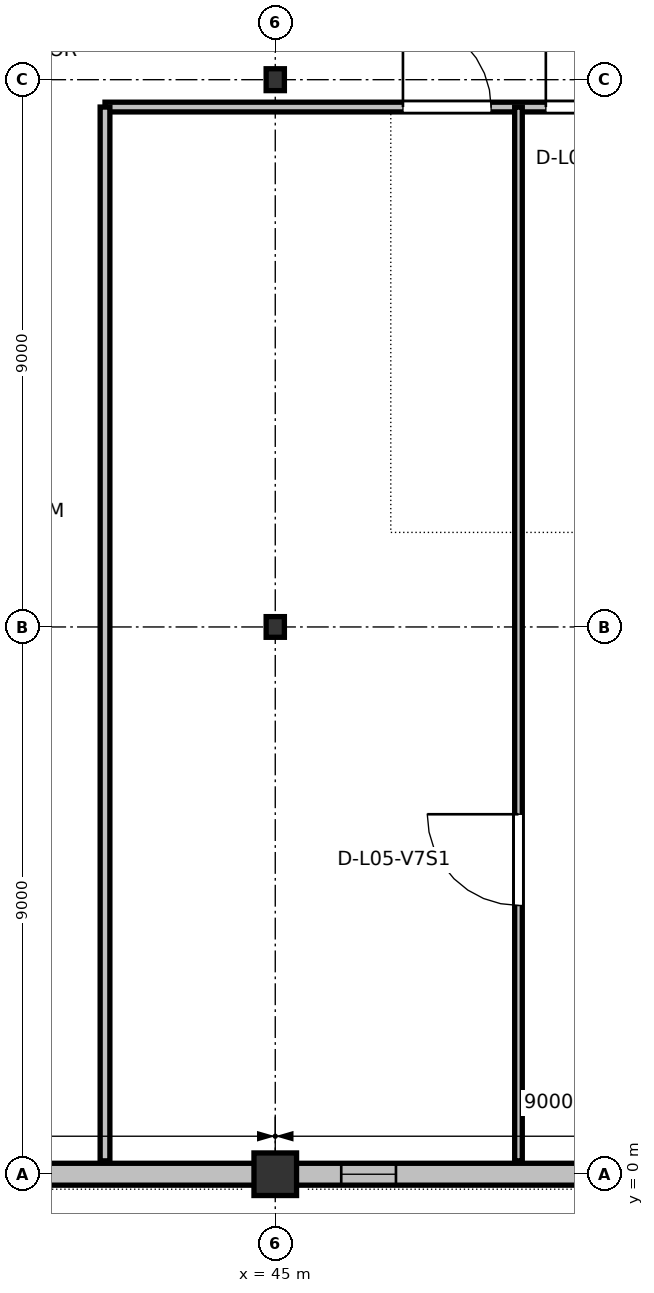
"""IFC4 building model, lengths in metres.
Left out: names, types, materials, properties, quantities, classifications, styles, units other than length and angle.
Written with IfcOpenShell. Run it as: python <this file> out.ifc"""

import sys

from ifc_helpers import new_model, si_unit, direction, frame, frame_2d, origin, origin_2d, place, context, subcontext, project, spatial, rectangle, i_section, extrude, element, fill, save


model = new_model("IFC4")
c1 = context("Model", 3, precision=1e-05, world=origin(), true_north=direction((0.0, 1.0)))
c2 = subcontext(c1, "Body", "Model", "MODEL_VIEW")
j1 = project(units=[si_unit("LENGTHUNIT", "METRE"), si_unit("PLANEANGLEUNIT", "RADIAN")], contexts=[c1])
p1 = place(None, origin())
s1 = spatial("IfcSite", under=j1, at=p1, CompositionType="ELEMENT")
p2 = place(p1, origin())
s2 = spatial("IfcBuilding", under=s1, at=p2, CompositionType="ELEMENT")
p3 = place(p2, frame((0.0, 0.0, 23.4)))
s3 = spatial("IfcBuildingStorey", under=s2, at=p3, CompositionType="ELEMENT", Elevation=23.4)
p4 = place(p3, frame((45.0, 0.0, 0.0), z_axis=(0.0, 0.0, 1.0), x_axis=(1.0, 0.0, 0.0)))
e1 = element("IfcColumn", 1, at=p4, inside=s3, PredefinedType="COLUMN", context=c2, shape_type="SweptSolid", body=[
    extrude(rectangle(XDim=0.7, YDim=0.7, at=origin_2d()), origin(), (0.0, 0.0, 1.0), 4.2),
])
p5 = place(p3, frame((45.0, 9.0, 0.0), z_axis=(0.0, 0.0, 1.0), x_axis=(1.0, 0.0, 0.0)))
e2 = element("IfcColumn", 2, at=p5, inside=s3, PredefinedType="COLUMN", context=c2, shape_type="SweptSolid", body=[
    extrude(i_section(OverallWidth=0.3, OverallDepth=0.34, WebThickness=0.012, FlangeThickness=0.021, at=origin_2d()), origin(), (0.0, 0.0, 1.0), 4.2),
])
p6 = place(p3, frame((45.0, 18.0, 0.0), z_axis=(0.0, 0.0, 1.0), x_axis=(1.0, 0.0, 0.0)))
e3 = element("IfcColumn", 3, at=p6, inside=s3, PredefinedType="COLUMN", context=c2, shape_type="SweptSolid", body=[
    extrude(i_section(OverallWidth=0.3, OverallDepth=0.36, WebThickness=0.012, FlangeThickness=0.022, at=origin_2d()), origin(), (0.0, 0.0, 1.0), 4.2),
])
p7 = place(p3, frame((36.335, 0.0, 0.0), z_axis=(0.0, 0.0, 1.0), x_axis=(1.0, 0.0, 0.0)))
e4 = element("IfcWall", 4, at=p7, inside=s3, PredefinedType="STANDARD", context=c2, shape_type="SweptSolid", body=[
    extrude(rectangle(XDim=8.33, YDim=0.36, at=frame_2d((4.165, 0.0))), origin(), (0.0, 0.0, 1.0), 3.715),
])
p8 = place(p7, frame((0.75, 0.0, 0.9)))
e5 = element("IfcOpeningElement", 5, at=p8, cuts=e4, PredefinedType="OPENING", context=c2, shape_type="SweptSolid", body=[
    extrude(rectangle(XDim=1.0, YDim=1.7, at=frame_2d((0.5, 0.85))), frame((0.0, 0.19, 0.0), z_axis=(0.0, -1.0, 0.0), x_axis=(1.0, 0.0, 0.0)), (0.0, 0.0, 1.0), 0.38),
])
p9 = place(p3, frame((45.335, 0.0, 0.0), z_axis=(0.0, 0.0, 1.0), x_axis=(1.0, 0.0, 0.0)))
e6 = element("IfcWall", 6, at=p9, inside=s3, PredefinedType="STANDARD", context=c2, shape_type="SweptSolid", body=[
    extrude(rectangle(XDim=8.33, YDim=0.36, at=frame_2d((4.165, 0.0))), origin(), (0.0, 0.0, 1.0), 3.715),
])
p10 = place(p9, frame((0.75, 0.0, 0.9)))
e7 = element("IfcOpeningElement", 7, at=p10, cuts=e6, PredefinedType="OPENING", context=c2, shape_type="SweptSolid", body=[
    extrude(rectangle(XDim=0.9, YDim=1.65, at=frame_2d((0.45, 0.825))), frame((0.0, 0.19, 0.0), z_axis=(0.0, -1.0, 0.0), x_axis=(1.0, 0.0, 0.0)), (0.0, 0.0, 1.0), 0.38),
])
p11 = place(p3, frame((42.2, 17.55, 0.0), z_axis=(0.0, 0.0, 1.0), x_axis=(1.0, 0.0, 0.0)))
e8 = element("IfcWall", 8, at=p11, inside=s3, PredefinedType="PARTITIONING", context=c2, shape_type="SweptSolid", body=[
    extrude(rectangle(XDim=23.6, YDim=0.16, at=frame_2d((11.8, 0.0))), origin(), (0.0, 0.0, 1.0), 3.96),
])
p12 = place(p11, frame((4.9, 0.0, 0.0)))
e9 = element("IfcOpeningElement", 9, at=p12, cuts=e8, PredefinedType="OPENING", context=c2, shape_type="SweptSolid", body=[
    extrude(rectangle(XDim=1.45, YDim=2.22, at=frame_2d((0.725, 1.11))), frame((0.0, 0.09, 0.0), z_axis=(0.0, -1.0, 0.0), x_axis=(1.0, 0.0, 0.0)), (0.0, 0.0, 1.0), 0.18),
])
p13 = place(p11, frame((7.25, 0.0, 0.0)))
e10 = element("IfcOpeningElement", 10, at=p13, cuts=e8, PredefinedType="OPENING", context=c2, shape_type="SweptSolid", body=[
    extrude(rectangle(XDim=1.55, YDim=2.24, at=frame_2d((0.775, 1.12))), frame((0.0, 0.09, 0.0), z_axis=(0.0, -1.0, 0.0), x_axis=(1.0, 0.0, 0.0)), (0.0, 0.0, 1.0), 0.18),
])
p14 = place(p11, frame((16.45, 0.0, 0.0)))
e11 = element("IfcOpeningElement", 11, at=p14, cuts=e8, PredefinedType="OPENING", context=c2, shape_type="SweptSolid", body=[
    extrude(rectangle(XDim=1.05, YDim=2.15, at=frame_2d((0.525, 1.075))), frame((0.0, 0.09, 0.0), z_axis=(0.0, -1.0, 0.0), x_axis=(1.0, 0.0, 0.0)), (0.0, 0.0, 1.0), 0.18),
])
p15 = place(p3, frame((42.2, 0.22, 0.0), z_axis=(0.0, 0.0, 1.0), x_axis=(0.0, 1.0, 0.0)))
e12 = element("IfcWall", 12, at=p15, inside=s3, PredefinedType="PARTITIONING", context=c2, shape_type="SweptSolid", body=[
    extrude(rectangle(XDim=17.33, YDim=0.16, at=frame_2d((8.665, 0.0))), origin(), (0.0, 0.0, 1.0), 3.96),
])
p16 = place(p3, frame((49.0, 0.22, 0.0), z_axis=(0.0, 0.0, 1.0), x_axis=(0.0, 1.0, 0.0)))
e13 = element("IfcWall", 13, at=p16, inside=s3, PredefinedType="PARTITIONING", context=c2, shape_type="SweptSolid", body=[
    extrude(rectangle(XDim=17.33, YDim=0.125, at=frame_2d((8.665, 0.0))), origin(), (0.0, 0.0, 1.0), 3.96),
])
p17 = place(p16, frame((4.2, 0.0, 0.0)))
e14 = element("IfcOpeningElement", 14, at=p17, cuts=e13, PredefinedType="OPENING", context=c2, shape_type="SweptSolid", body=[
    extrude(rectangle(XDim=1.5, YDim=2.2, at=frame_2d((0.75, 1.1))), frame((0.0, 0.073, 0.0), z_axis=(0.0, -1.0, 0.0), x_axis=(1.0, 0.0, 0.0)), (0.0, 0.0, 1.0), 0.145),
])
p18 = place(p10, origin())
e15 = element("IfcWindow", 15, at=p18, inside=s3, PartitioningType="SINGLE_PANEL", PredefinedType="WINDOW", context=c2, shape_type="SweptSolid", body=[
    extrude(rectangle(XDim=0.9, YDim=1.65, at=frame_2d((0.45, 0.825))), frame((0.0, 0.03, 0.0), z_axis=(0.0, -1.0, 0.0), x_axis=(1.0, 0.0, 0.0)), (0.0, 0.0, 1.0), 0.06),
])
fill(e7, e15)
p19 = place(p12, origin())
e16 = element("IfcDoor", 16, at=p19, inside=s3, OperationType="SINGLE_SWING_LEFT", PredefinedType="DOOR", context=c2, shape_type="SweptSolid", body=[
    extrude(rectangle(XDim=1.45, YDim=2.22, at=frame_2d((0.725, 1.11))), frame((0.0, 0.025, 0.0), z_axis=(0.0, -1.0, 0.0), x_axis=(1.0, 0.0, 0.0)), (0.0, 0.0, 1.0), 0.05),
])
fill(e9, e16)
p20 = place(p17, origin())
e17 = element("IfcDoor", 17, at=p20, inside=s3, OperationType="SINGLE_SWING_RIGHT", PredefinedType="DOOR", context=c2, shape_type="SweptSolid", body=[
    extrude(rectangle(XDim=1.5, YDim=2.2, at=frame_2d((0.75, 1.1))), frame((0.0, 0.025, 0.0), z_axis=(0.0, -1.0, 0.0), x_axis=(1.0, 0.0, 0.0)), (0.0, 0.0, 1.0), 0.05),
])
fill(e14, e17)
p21 = place(p13, origin())
e18 = element("IfcDoor", 18, at=p21, inside=s3, OperationType="SINGLE_SWING_LEFT", PredefinedType="DOOR", context=c2, shape_type="SweptSolid", body=[
    extrude(rectangle(XDim=1.55, YDim=2.24, at=frame_2d((0.775, 1.12))), frame((0.0, 0.025, 0.0), z_axis=(0.0, -1.0, 0.0), x_axis=(1.0, 0.0, 0.0)), (0.0, 0.0, 1.0), 0.05),
])
fill(e10, e18)
save(model, sys.argv[1])
